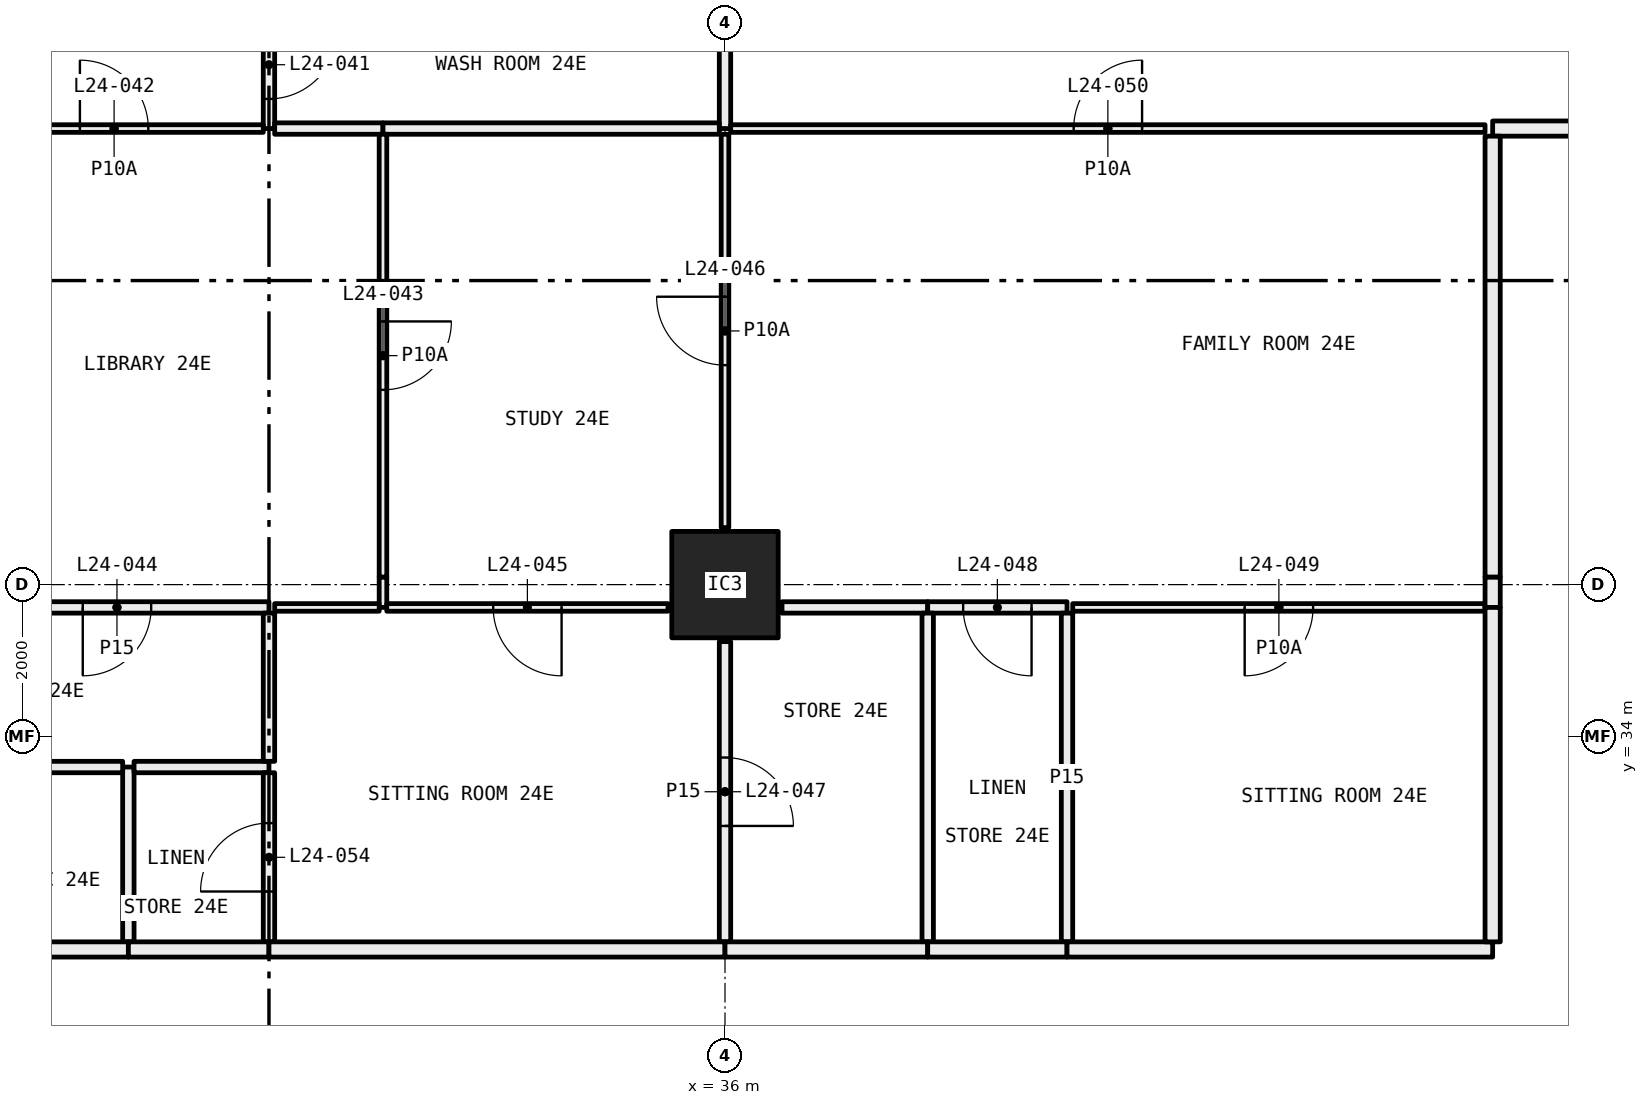
"""IFC4 building model, lengths in metres.
Left out: names, types, materials, properties, quantities, classifications, styles, units other than length and angle.
Written with IfcOpenShell. Run it as: python <this file> out.ifc"""

import sys

from ifc_helpers import new_model, si_unit, direction, frame, frame_2d, origin, origin_2d, place, context, subcontext, project, spatial, rectangle, hollow_rectangle, extrude, element, fill, save


model = new_model("IFC4")
c1 = context("Model", 3, precision=1e-05, world=origin(), true_north=direction((0.0, 1.0)))
c2 = subcontext(c1, "Body", "Model", "MODEL_VIEW")
j1 = project(units=[si_unit("LENGTHUNIT", "METRE"), si_unit("PLANEANGLEUNIT", "RADIAN")], contexts=[c1])
p1 = place(None, origin())
s1 = spatial("IfcSite", under=j1, at=p1, CompositionType="ELEMENT")
p2 = place(p1, origin())
s2 = spatial("IfcBuilding", under=s1, at=p2, CompositionType="ELEMENT")
p3 = place(p2, frame((0.0, 0.0, 96.6)))
s3 = spatial("IfcBuildingStorey", under=s2, at=p3, CompositionType="ELEMENT", Elevation=96.6)
p4 = place(p3, frame((36.0, 36.0, 0.0), z_axis=(0.0, 0.0, 1.0), x_axis=(1.0, 0.0, 0.0)))
e1 = element("IfcColumn", 1, at=p4, inside=s3, PredefinedType="COLUMN", context=c2, shape_type="SweptSolid", body=[
    extrude(hollow_rectangle(XDim=1.4, YDim=1.4, WallThickness=0.06, at=origin_2d()), origin(), (0.0, 0.0, 1.0), 3.05),
])
p5 = place(p3, frame((30.0, 42.0, 0.0), z_axis=(0.0, 0.0, 1.0), x_axis=(0.0, 1.0, 0.0)))
e2 = element("IfcWall", 2, at=p5, inside=s3, PredefinedType="PARTITIONING", context=c2, shape_type="SweptSolid", body=[
    extrude(rectangle(XDim=1.68, YDim=0.15, at=frame_2d((0.84, 0.0))), origin(), (0.0, 0.0, 1.0), 3.05),
])
p6 = place(p5, frame((0.39, 0.0, 0.0)))
e3 = element("IfcOpeningElement", 3, at=p6, cuts=e2, PredefinedType="OPENING", context=c2, shape_type="SweptSolid", body=[
    extrude(rectangle(XDim=0.9, YDim=2.1, at=frame_2d((0.45, 1.05))), frame((0.0, 0.085, 0.0), z_axis=(0.0, -1.0, 0.0), x_axis=(1.0, 0.0, 0.0)), (0.0, 0.0, 1.0), 0.17),
])
p7 = place(p3, frame((26.0, 42.0, 0.0), z_axis=(0.0, 0.0, 1.0), x_axis=(1.0, 0.0, 0.0)))
e4 = element("IfcWall", 4, at=p7, inside=s3, PredefinedType="PARTITIONING", context=c2, shape_type="SweptSolid", body=[
    extrude(rectangle(XDim=3.925, YDim=0.1, at=frame_2d((1.962, 0.0))), origin(), (0.0, 0.0, 1.0), 3.05),
])
p8 = place(p7, frame((1.512, 0.0, 0.0)))
e5 = element("IfcOpeningElement", 5, at=p8, cuts=e4, PredefinedType="OPENING", context=c2, shape_type="SweptSolid", body=[
    extrude(rectangle(XDim=0.9, YDim=2.1, at=frame_2d((0.45, 1.05))), frame((0.0, 0.06, 0.0), z_axis=(0.0, -1.0, 0.0), x_axis=(1.0, 0.0, 0.0)), (0.0, 0.0, 1.0), 0.12),
])
p9 = place(p3, frame((36.0, 42.0, 0.0), z_axis=(0.0, 0.0, 1.0), x_axis=(0.0, 1.0, 0.0)))
e6 = element("IfcWall", 6, at=p9, inside=s3, PredefinedType="PARTITIONING", context=c2, shape_type="SweptSolid", body=[
    extrude(rectangle(XDim=1.605, YDim=0.15, at=frame_2d((0.802, 0.0))), origin(), (0.0, 0.0, 1.0), 2.45),
])
p10 = place(p3, frame((30.075, 42.0, 0.0), z_axis=(0.0, 0.0, 1.0), x_axis=(1.0, 0.0, 0.0)))
e7 = element("IfcWall", 7, at=p10, inside=s3, PredefinedType="PARTITIONING", context=c2, shape_type="SweptSolid", body=[
    extrude(rectangle(XDim=1.425, YDim=0.15, at=frame_2d((0.712, 0.0))), origin(), (0.0, 0.0, 1.0), 3.05),
])
p11 = place(p3, frame((31.5, 42.0, 0.0), z_axis=(0.0, 0.0, 1.0), x_axis=(1.0, 0.0, 0.0)))
e8 = element("IfcWall", 8, at=p11, inside=s3, PredefinedType="PARTITIONING", context=c2, shape_type="SweptSolid", body=[
    extrude(rectangle(XDim=4.425, YDim=0.15, at=frame_2d((2.212, 0.0))), origin(), (0.0, 0.0, 1.0), 2.45),
])
p12 = place(p3, frame((36.075, 42.0, 0.0), z_axis=(0.0, 0.0, 1.0), x_axis=(1.0, 0.0, 0.0)))
e9 = element("IfcWall", 9, at=p12, inside=s3, PredefinedType="PARTITIONING", context=c2, shape_type="SweptSolid", body=[
    extrude(rectangle(XDim=9.925, YDim=0.1, at=frame_2d((4.962, 0.0))), origin(), (0.0, 0.0, 1.0), 2.45),
])
p13 = place(p12, frame((4.512, 0.0, 0.0)))
e10 = element("IfcOpeningElement", 10, at=p13, cuts=e9, PredefinedType="OPENING", context=c2, shape_type="SweptSolid", body=[
    extrude(rectangle(XDim=0.9, YDim=2.1, at=frame_2d((0.45, 1.05))), frame((0.0, 0.06, 0.0), z_axis=(0.0, -1.0, 0.0), x_axis=(1.0, 0.0, 0.0)), (0.0, 0.0, 1.0), 0.12),
])
p14 = place(p3, frame((46.1, 42.0, 0.0), z_axis=(0.0, 0.0, 1.0), x_axis=(1.0, 0.0, 0.0)))
e11 = element("IfcWall", 11, at=p14, inside=s3, PredefinedType="PARTITIONING", context=c2, shape_type="SweptSolid", body=[
    extrude(rectangle(XDim=7.9, YDim=0.2, at=frame_2d((3.95, 0.0))), origin(), (0.0, 0.0, 1.0), 3.05),
])
p15 = place(p3, frame((31.5, 35.7, 0.0), z_axis=(0.0, 0.0, 1.0), x_axis=(0.0, 1.0, 0.0)))
e12 = element("IfcWall", 12, at=p15, inside=s3, PredefinedType="PARTITIONING", context=c2, shape_type="SweptSolid", body=[
    extrude(rectangle(XDim=0.4, YDim=0.1, at=frame_2d((0.2, 0.0))), origin(), (0.0, 0.0, 1.0), 2.45),
])
p16 = place(p3, frame((31.5, 36.1, 0.0), z_axis=(0.0, 0.0, 1.0), x_axis=(0.0, 1.0, 0.0)))
e13 = element("IfcWall", 13, at=p16, inside=s3, PredefinedType="PARTITIONING", context=c2, shape_type="SweptSolid", body=[
    extrude(rectangle(XDim=5.825, YDim=0.1, at=frame_2d((2.913, 0.0))), origin(), (0.0, 0.0, 1.0), 3.05),
])
p17 = place(p16, frame((2.462, 0.0, 0.0)))
e14 = element("IfcOpeningElement", 14, at=p17, cuts=e13, PredefinedType="OPENING", context=c2, shape_type="SweptSolid", body=[
    extrude(rectangle(XDim=0.9, YDim=2.1, at=frame_2d((0.45, 1.05))), frame((0.0, 0.06, 0.0), z_axis=(0.0, -1.0, 0.0), x_axis=(1.0, 0.0, 0.0)), (0.0, 0.0, 1.0), 0.12),
])
p18 = place(p3, frame((26.0, 35.7, 0.0), z_axis=(0.0, 0.0, 1.0), x_axis=(1.0, 0.0, 0.0)))
e15 = element("IfcWall", 15, at=p18, inside=s3, PredefinedType="PARTITIONING", context=c2, shape_type="SweptSolid", body=[
    extrude(rectangle(XDim=4.0, YDim=0.15, at=frame_2d((2.0, 0.0))), origin(), (0.0, 0.0, 1.0), 3.05),
])
p19 = place(p18, frame((1.55, 0.0, 0.0)))
e16 = element("IfcOpeningElement", 16, at=p19, cuts=e15, PredefinedType="OPENING", context=c2, shape_type="SweptSolid", body=[
    extrude(rectangle(XDim=0.9, YDim=2.1, at=frame_2d((0.45, 1.05))), frame((0.0, 0.085, 0.0), z_axis=(0.0, -1.0, 0.0), x_axis=(1.0, 0.0, 0.0)), (0.0, 0.0, 1.0), 0.17),
])
p20 = place(p3, frame((30.075, 35.7, 0.0), z_axis=(0.0, 0.0, 1.0), x_axis=(1.0, 0.0, 0.0)))
e17 = element("IfcWall", 17, at=p20, inside=s3, PredefinedType="PARTITIONING", context=c2, shape_type="SweptSolid", body=[
    extrude(rectangle(XDim=1.375, YDim=0.1, at=frame_2d((0.688, 0.0))), origin(), (0.0, 0.0, 1.0), 3.05),
])
p21 = place(p3, frame((31.55, 35.7, 0.0), z_axis=(0.0, 0.0, 1.0), x_axis=(1.0, 0.0, 0.0)))
e18 = element("IfcWall", 18, at=p21, inside=s3, PredefinedType="PARTITIONING", context=c2, shape_type="SweptSolid", body=[
    extrude(rectangle(XDim=3.7, YDim=0.1, at=frame_2d((1.85, 0.0))), origin(), (0.0, 0.0, 1.0), 3.05),
])
p22 = place(p21, frame((1.4, 0.0, 0.0)))
e19 = element("IfcOpeningElement", 19, at=p22, cuts=e18, PredefinedType="OPENING", context=c2, shape_type="SweptSolid", body=[
    extrude(rectangle(XDim=0.9, YDim=2.1, at=frame_2d((0.45, 1.05))), frame((0.0, 0.06, 0.0), z_axis=(0.0, -1.0, 0.0), x_axis=(1.0, 0.0, 0.0)), (0.0, 0.0, 1.0), 0.12),
])
p23 = place(p3, frame((36.0, 36.75, 0.0), z_axis=(0.0, 0.0, 1.0), x_axis=(0.0, 1.0, 0.0)))
e20 = element("IfcWall", 20, at=p23, inside=s3, PredefinedType="PARTITIONING", context=c2, shape_type="SweptSolid", body=[
    extrude(rectangle(XDim=5.175, YDim=0.1, at=frame_2d((2.587, 0.0))), origin(), (0.0, 0.0, 1.0), 2.45),
])
p24 = place(p23, frame((2.137, 0.0, 0.0)))
e21 = element("IfcOpeningElement", 21, at=p24, cuts=e20, PredefinedType="OPENING", context=c2, shape_type="SweptSolid", body=[
    extrude(rectangle(XDim=0.9, YDim=2.1, at=frame_2d((0.45, 1.05))), frame((0.0, 0.06, 0.0), z_axis=(0.0, -1.0, 0.0), x_axis=(1.0, 0.0, 0.0)), (0.0, 0.0, 1.0), 0.12),
])
p25 = place(p3, frame((28.15, 31.3, 0.0), z_axis=(0.0, 0.0, 1.0), x_axis=(0.0, 1.0, 0.0)))
e22 = element("IfcWall", 22, at=p25, inside=s3, PredefinedType="PARTITIONING", context=c2, shape_type="SweptSolid", body=[
    extrude(rectangle(XDim=2.3, YDim=0.15, at=frame_2d((1.15, 0.0))), origin(), (0.0, 0.0, 1.0), 3.05),
])
p26 = place(p3, frame((28.075, 33.6, 0.0), z_axis=(0.0, 0.0, 1.0), x_axis=(-1.0, 0.0, 0.0)))
e23 = element("IfcWall", 23, at=p26, inside=s3, PredefinedType="PARTITIONING", context=c2, shape_type="SweptSolid", body=[
    extrude(rectangle(XDim=2.075, YDim=0.15, at=frame_2d((1.038, 0.0))), origin(), (0.0, 0.0, 1.0), 3.05),
])
p27 = place(p3, frame((26.0, 31.2, 0.0), z_axis=(0.0, 0.0, 1.0), x_axis=(1.0, 0.0, 0.0)))
e24 = element("IfcWall", 24, at=p27, inside=s3, PredefinedType="PARTITIONING", context=c2, shape_type="SweptSolid", body=[
    extrude(rectangle(XDim=2.15, YDim=0.2, at=frame_2d((1.075, 0.0))), origin(), (0.0, 0.0, 1.0), 3.05),
])
p28 = place(p3, frame((30.0, 33.6, 0.0), z_axis=(0.0, 0.0, 1.0), x_axis=(-1.0, 0.0, 0.0)))
e25 = element("IfcWall", 25, at=p28, inside=s3, PredefinedType="PARTITIONING", context=c2, shape_type="SweptSolid", body=[
    extrude(rectangle(XDim=1.775, YDim=0.15, at=frame_2d((0.887, 0.0))), origin(), (0.0, 0.0, 1.0), 3.05),
])
p29 = place(p3, frame((30.0, 31.3, 0.0), z_axis=(0.0, 0.0, 1.0), x_axis=(0.0, 1.0, 0.0)))
e26 = element("IfcWall", 26, at=p29, inside=s3, PredefinedType="PARTITIONING", context=c2, shape_type="SweptSolid", body=[
    extrude(rectangle(XDim=2.225, YDim=0.15, at=frame_2d((1.112, 0.0))), origin(), (0.0, 0.0, 1.0), 3.05),
])
p30 = place(p29, frame((0.663, 0.0, 0.0)))
e27 = element("IfcOpeningElement", 27, at=p30, cuts=e26, PredefinedType="OPENING", context=c2, shape_type="SweptSolid", body=[
    extrude(rectangle(XDim=0.9, YDim=2.1, at=frame_2d((0.45, 1.05))), frame((0.0, 0.085, 0.0), z_axis=(0.0, -1.0, 0.0), x_axis=(1.0, 0.0, 0.0)), (0.0, 0.0, 1.0), 0.17),
])
p31 = place(p3, frame((28.15, 31.2, 0.0), z_axis=(0.0, 0.0, 1.0), x_axis=(1.0, 0.0, 0.0)))
e28 = element("IfcWall", 28, at=p31, inside=s3, PredefinedType="PARTITIONING", context=c2, shape_type="SweptSolid", body=[
    extrude(rectangle(XDim=1.85, YDim=0.2, at=frame_2d((0.925, 0.0))), origin(), (0.0, 0.0, 1.0), 3.05),
])
p32 = place(p3, frame((30.0, 33.675, 0.0), z_axis=(0.0, 0.0, 1.0), x_axis=(0.0, 1.0, 0.0)))
e29 = element("IfcWall", 29, at=p32, inside=s3, PredefinedType="PARTITIONING", context=c2, shape_type="SweptSolid", body=[
    extrude(rectangle(XDim=1.95, YDim=0.15, at=frame_2d((0.975, 0.0))), origin(), (0.0, 0.0, 1.0), 3.05),
])
p33 = place(p3, frame((36.0, 31.3, 0.0), z_axis=(0.0, 0.0, 1.0), x_axis=(0.0, 1.0, 0.0)))
e30 = element("IfcWall", 30, at=p33, inside=s3, PredefinedType="PARTITIONING", context=c2, shape_type="SweptSolid", body=[
    extrude(rectangle(XDim=3.95, YDim=0.15, at=frame_2d((1.975, 0.0))), origin(), (0.0, 0.0, 1.0), 2.45),
])
p34 = place(p33, frame((1.525, 0.0, 0.0)))
e31 = element("IfcOpeningElement", 31, at=p34, cuts=e30, PredefinedType="OPENING", context=c2, shape_type="SweptSolid", body=[
    extrude(rectangle(XDim=0.9, YDim=2.1, at=frame_2d((0.45, 1.05))), frame((0.0, 0.085, 0.0), z_axis=(0.0, -1.0, 0.0), x_axis=(1.0, 0.0, 0.0)), (0.0, 0.0, 1.0), 0.17),
])
p35 = place(p3, frame((30.0, 31.2, 0.0), z_axis=(0.0, 0.0, 1.0), x_axis=(1.0, 0.0, 0.0)))
e32 = element("IfcWall", 32, at=p35, inside=s3, PredefinedType="PARTITIONING", context=c2, shape_type="SweptSolid", body=[
    extrude(rectangle(XDim=6.0, YDim=0.2, at=frame_2d((3.0, 0.0))), origin(), (0.0, 0.0, 1.0), 2.45),
])
p36 = place(p3, frame((36.75, 35.7, 0.0), z_axis=(0.0, 0.0, 1.0), x_axis=(1.0, 0.0, 0.0)))
e33 = element("IfcWall", 33, at=p36, inside=s3, PredefinedType="PARTITIONING", context=c2, shape_type="SweptSolid", body=[
    extrude(rectangle(XDim=1.917, YDim=0.15, at=frame_2d((0.958, 0.0))), origin(), (0.0, 0.0, 1.0), 3.05),
])
p37 = place(p3, frame((38.667, 35.7, 0.0), z_axis=(0.0, 0.0, 1.0), x_axis=(1.0, 0.0, 0.0)))
e34 = element("IfcWall", 34, at=p37, inside=s3, PredefinedType="PARTITIONING", context=c2, shape_type="SweptSolid", body=[
    extrude(rectangle(XDim=1.833, YDim=0.15, at=frame_2d((0.917, 0.0))), origin(), (0.0, 0.0, 1.0), 3.05),
])
p38 = place(p37, frame((0.467, 0.0, 0.0)))
e35 = element("IfcOpeningElement", 35, at=p38, cuts=e34, PredefinedType="OPENING", context=c2, shape_type="SweptSolid", body=[
    extrude(rectangle(XDim=0.9, YDim=2.1, at=frame_2d((0.45, 1.05))), frame((0.0, 0.085, 0.0), z_axis=(0.0, -1.0, 0.0), x_axis=(1.0, 0.0, 0.0)), (0.0, 0.0, 1.0), 0.17),
])
p39 = place(p3, frame((40.575, 35.7, 0.0), z_axis=(0.0, 0.0, 1.0), x_axis=(1.0, 0.0, 0.0)))
e36 = element("IfcWall", 36, at=p39, inside=s3, PredefinedType="PARTITIONING", context=c2, shape_type="SweptSolid", body=[
    extrude(rectangle(XDim=5.425, YDim=0.1, at=frame_2d((2.712, 0.0))), origin(), (0.0, 0.0, 1.0), 3.05),
])
p40 = place(p39, frame((2.262, 0.0, 0.0)))
e37 = element("IfcOpeningElement", 37, at=p40, cuts=e36, PredefinedType="OPENING", context=c2, shape_type="SweptSolid", body=[
    extrude(rectangle(XDim=0.9, YDim=2.1, at=frame_2d((0.45, 1.05))), frame((0.0, 0.06, 0.0), z_axis=(0.0, -1.0, 0.0), x_axis=(1.0, 0.0, 0.0)), (0.0, 0.0, 1.0), 0.12),
])
p41 = place(p3, frame((46.1, 35.7, 0.0), z_axis=(0.0, 0.0, 1.0), x_axis=(0.0, 1.0, 0.0)))
e38 = element("IfcWall", 38, at=p41, inside=s3, PredefinedType="PARTITIONING", context=c2, shape_type="SweptSolid", body=[
    extrude(rectangle(XDim=0.4, YDim=0.2, at=frame_2d((0.2, 0.0))), origin(), (0.0, 0.0, 1.0), 2.45),
])
p42 = place(p3, frame((46.1, 36.1, 0.0), z_axis=(0.0, 0.0, 1.0), x_axis=(0.0, 1.0, 0.0)))
e39 = element("IfcWall", 39, at=p42, inside=s3, PredefinedType="PARTITIONING", context=c2, shape_type="SweptSolid", body=[
    extrude(rectangle(XDim=5.8, YDim=0.2, at=frame_2d((2.9, 0.0))), origin(), (0.0, 0.0, 1.0), 3.05),
])
p43 = place(p3, frame((38.667, 31.3, 0.0), z_axis=(0.0, 0.0, 1.0), x_axis=(0.0, 1.0, 0.0)))
e40 = element("IfcWall", 40, at=p43, inside=s3, PredefinedType="PARTITIONING", context=c2, shape_type="SweptSolid", body=[
    extrude(rectangle(XDim=4.325, YDim=0.15, at=frame_2d((2.163, 0.0))), origin(), (0.0, 0.0, 1.0), 3.05),
])
p44 = place(p3, frame((36.0, 31.2, 0.0), z_axis=(0.0, 0.0, 1.0), x_axis=(1.0, 0.0, 0.0)))
e41 = element("IfcWall", 41, at=p44, inside=s3, PredefinedType="PARTITIONING", context=c2, shape_type="SweptSolid", body=[
    extrude(rectangle(XDim=2.667, YDim=0.2, at=frame_2d((1.333, 0.0))), origin(), (0.0, 0.0, 1.0), 2.45),
])
p45 = place(p3, frame((40.5, 31.3, 0.0), z_axis=(0.0, 0.0, 1.0), x_axis=(0.0, 1.0, 0.0)))
e42 = element("IfcWall", 42, at=p45, inside=s3, PredefinedType="PARTITIONING", context=c2, shape_type="SweptSolid", body=[
    extrude(rectangle(XDim=4.325, YDim=0.15, at=frame_2d((2.163, 0.0))), origin(), (0.0, 0.0, 1.0), 3.05),
])
p46 = place(p3, frame((38.667, 31.2, 0.0), z_axis=(0.0, 0.0, 1.0), x_axis=(1.0, 0.0, 0.0)))
e43 = element("IfcWall", 43, at=p46, inside=s3, PredefinedType="PARTITIONING", context=c2, shape_type="SweptSolid", body=[
    extrude(rectangle(XDim=1.833, YDim=0.2, at=frame_2d((0.917, 0.0))), origin(), (0.0, 0.0, 1.0), 3.05),
])
p47 = place(p3, frame((40.5, 31.2, 0.0), z_axis=(0.0, 0.0, 1.0), x_axis=(1.0, 0.0, 0.0)))
e44 = element("IfcWall", 44, at=p47, inside=s3, PredefinedType="PARTITIONING", context=c2, shape_type="SweptSolid", body=[
    extrude(rectangle(XDim=5.6, YDim=0.2, at=frame_2d((2.8, 0.0))), origin(), (0.0, 0.0, 1.0), 3.05),
])
p48 = place(p3, frame((46.1, 31.3, 0.0), z_axis=(0.0, 0.0, 1.0), x_axis=(0.0, 1.0, 0.0)))
e45 = element("IfcWall", 45, at=p48, inside=s3, PredefinedType="PARTITIONING", context=c2, shape_type="SweptSolid", body=[
    extrude(rectangle(XDim=4.4, YDim=0.2, at=frame_2d((2.2, 0.0))), origin(), (0.0, 0.0, 1.0), 3.05),
])
p49 = place(p6, frame((0.9, 0.0, 0.0), x_axis=(-1.0, 0.0, 0.0)))
e46 = element("IfcDoor", 46, at=p49, inside=s3, OperationType="SINGLE_SWING_RIGHT", PredefinedType="DOOR", context=c2, shape_type="SweptSolid", body=[
    extrude(rectangle(XDim=0.9, YDim=2.1, at=frame_2d((0.45, 1.05))), frame((0.0, 0.025, 0.0), z_axis=(0.0, -1.0, 0.0), x_axis=(1.0, 0.0, 0.0)), (0.0, 0.0, 1.0), 0.05),
])
fill(e3, e46)
p50 = place(p8, origin())
e47 = element("IfcDoor", 47, at=p50, inside=s3, OperationType="SINGLE_SWING_RIGHT", PredefinedType="DOOR", context=c2, shape_type="SweptSolid", body=[
    extrude(rectangle(XDim=0.9, YDim=2.1, at=frame_2d((0.45, 1.05))), frame((0.0, 0.025, 0.0), z_axis=(0.0, -1.0, 0.0), x_axis=(1.0, 0.0, 0.0)), (0.0, 0.0, 1.0), 0.05),
])
fill(e5, e47)
p51 = place(p17, frame((0.9, 0.0, 0.0), x_axis=(-1.0, 0.0, 0.0)))
e48 = element("IfcDoor", 48, at=p51, inside=s3, OperationType="SINGLE_SWING_RIGHT", PredefinedType="DOOR", context=c2, shape_type="SweptSolid", body=[
    extrude(rectangle(XDim=0.9, YDim=2.1, at=frame_2d((0.45, 1.05))), frame((0.0, 0.025, 0.0), z_axis=(0.0, -1.0, 0.0), x_axis=(1.0, 0.0, 0.0)), (0.0, 0.0, 1.0), 0.05),
])
fill(e14, e48)
p52 = place(p19, frame((0.9, 0.0, 0.0), x_axis=(-1.0, 0.0, 0.0)))
e49 = element("IfcDoor", 49, at=p52, inside=s3, OperationType="SINGLE_SWING_LEFT", PredefinedType="DOOR", context=c2, shape_type="SweptSolid", body=[
    extrude(rectangle(XDim=0.9, YDim=2.1, at=frame_2d((0.45, 1.05))), frame((0.0, 0.025, 0.0), z_axis=(0.0, -1.0, 0.0), x_axis=(1.0, 0.0, 0.0)), (0.0, 0.0, 1.0), 0.05),
])
fill(e16, e49)
p53 = place(p22, frame((0.9, 0.0, 0.0), x_axis=(-1.0, 0.0, 0.0)))
e50 = element("IfcDoor", 50, at=p53, inside=s3, OperationType="SINGLE_SWING_RIGHT", PredefinedType="DOOR", context=c2, shape_type="SweptSolid", body=[
    extrude(rectangle(XDim=0.9, YDim=2.1, at=frame_2d((0.45, 1.05))), frame((0.0, 0.025, 0.0), z_axis=(0.0, -1.0, 0.0), x_axis=(1.0, 0.0, 0.0)), (0.0, 0.0, 1.0), 0.05),
])
fill(e19, e50)
p54 = place(p24, origin())
e51 = element("IfcDoor", 51, at=p54, inside=s3, OperationType="SINGLE_SWING_LEFT", PredefinedType="DOOR", context=c2, shape_type="SweptSolid", body=[
    extrude(rectangle(XDim=0.9, YDim=2.1, at=frame_2d((0.45, 1.05))), frame((0.0, 0.025, 0.0), z_axis=(0.0, -1.0, 0.0), x_axis=(1.0, 0.0, 0.0)), (0.0, 0.0, 1.0), 0.05),
])
fill(e21, e51)
p55 = place(p34, frame((0.9, 0.0, 0.0), x_axis=(-1.0, 0.0, 0.0)))
e52 = element("IfcDoor", 52, at=p55, inside=s3, OperationType="SINGLE_SWING_LEFT", PredefinedType="DOOR", context=c2, shape_type="SweptSolid", body=[
    extrude(rectangle(XDim=0.9, YDim=2.1, at=frame_2d((0.45, 1.05))), frame((0.0, 0.025, 0.0), z_axis=(0.0, -1.0, 0.0), x_axis=(1.0, 0.0, 0.0)), (0.0, 0.0, 1.0), 0.05),
])
fill(e31, e52)
p56 = place(p38, frame((0.9, 0.0, 0.0), x_axis=(-1.0, 0.0, 0.0)))
e53 = element("IfcDoor", 53, at=p56, inside=s3, OperationType="SINGLE_SWING_RIGHT", PredefinedType="DOOR", context=c2, shape_type="SweptSolid", body=[
    extrude(rectangle(XDim=0.9, YDim=2.1, at=frame_2d((0.45, 1.05))), frame((0.0, 0.025, 0.0), z_axis=(0.0, -1.0, 0.0), x_axis=(1.0, 0.0, 0.0)), (0.0, 0.0, 1.0), 0.05),
])
fill(e35, e53)
p57 = place(p40, frame((0.9, 0.0, 0.0), x_axis=(-1.0, 0.0, 0.0)))
e54 = element("IfcDoor", 54, at=p57, inside=s3, OperationType="SINGLE_SWING_LEFT", PredefinedType="DOOR", context=c2, shape_type="SweptSolid", body=[
    extrude(rectangle(XDim=0.9, YDim=2.1, at=frame_2d((0.45, 1.05))), frame((0.0, 0.025, 0.0), z_axis=(0.0, -1.0, 0.0), x_axis=(1.0, 0.0, 0.0)), (0.0, 0.0, 1.0), 0.05),
])
fill(e37, e54)
p58 = place(p13, origin())
e55 = element("IfcDoor", 55, at=p58, inside=s3, OperationType="SINGLE_SWING_LEFT", PredefinedType="DOOR", context=c2, shape_type="SweptSolid", body=[
    extrude(rectangle(XDim=0.9, YDim=2.1, at=frame_2d((0.45, 1.05))), frame((0.0, 0.025, 0.0), z_axis=(0.0, -1.0, 0.0), x_axis=(1.0, 0.0, 0.0)), (0.0, 0.0, 1.0), 0.05),
])
fill(e10, e55)
p59 = place(p30, origin())
e56 = element("IfcDoor", 56, at=p59, inside=s3, OperationType="SINGLE_SWING_RIGHT", PredefinedType="DOOR", context=c2, shape_type="SweptSolid", body=[
    extrude(rectangle(XDim=0.9, YDim=2.1, at=frame_2d((0.45, 1.05))), frame((0.0, 0.025, 0.0), z_axis=(0.0, -1.0, 0.0), x_axis=(1.0, 0.0, 0.0)), (0.0, 0.0, 1.0), 0.05),
])
fill(e27, e56)
save(model, sys.argv[1])
